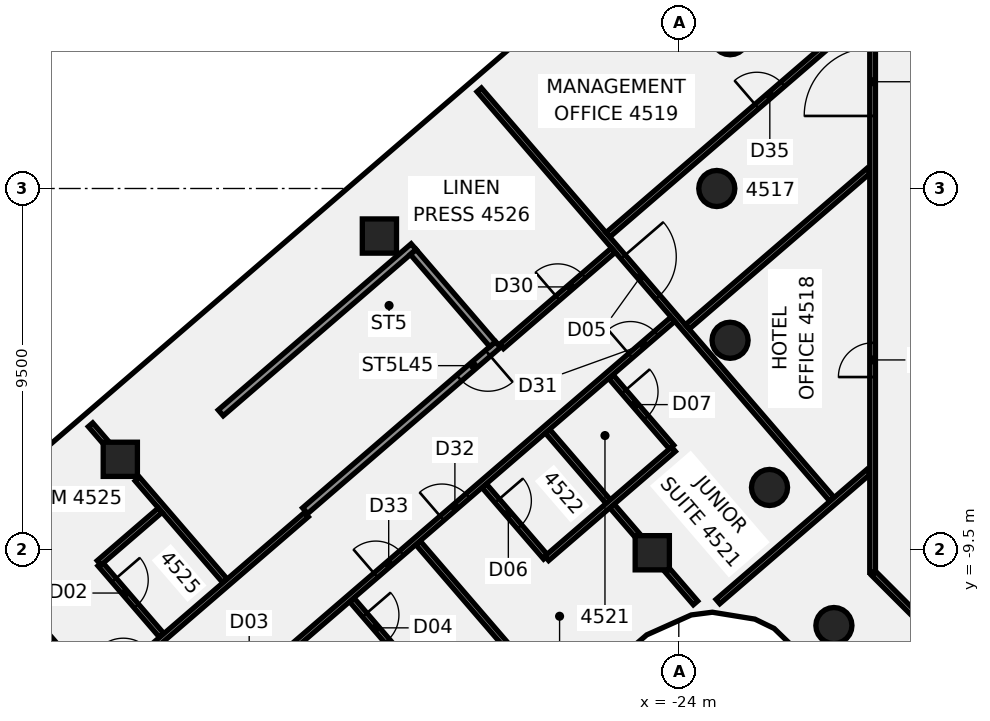
"""IFC4 building model, lengths in metres.
Left out: names, types, materials, properties, quantities, classifications, styles, units other than length and angle.
Written with IfcOpenShell. Run it as: python <this file> out.ifc"""

import sys

from ifc_helpers import new_model, si_unit, direction, frame, frame_2d, origin, origin_2d, place, context, subcontext, project, spatial, polyline, rectangle, circle, outline, extrude, element, fill, save


model = new_model("IFC4")
c1 = context("Model", 3, precision=1e-05, world=origin(), true_north=direction((0.0, 1.0)))
c2 = subcontext(c1, "Body", "Model", "MODEL_VIEW")
j1 = project(units=[si_unit("LENGTHUNIT", "METRE"), si_unit("PLANEANGLEUNIT", "RADIAN")], contexts=[c1])
p1 = place(None, origin())
s1 = spatial("IfcSite", under=j1, at=p1, CompositionType="ELEMENT")
p2 = place(p1, origin())
s2 = spatial("IfcBuilding", under=s1, at=p2, CompositionType="ELEMENT")
p3 = place(p2, frame((0.0, 0.0, 182.5)))
s3 = spatial("IfcBuildingStorey", under=s2, at=p3, CompositionType="ELEMENT", Elevation=182.5)
for number, where, z_axis, x_axis in (
    (1, (-22.651, 3.994, -0.14), (0.0, 0.0, 1.0), (1.0, 0.0, 0.0)),
    (2, (-23.0, 0.0, -0.14), (0.0, 0.0, 1.0), (1.0, 0.0, 0.0)),
    (3, (-22.651, -3.994, -0.14), (0.0, 0.0, 1.0), (1.0, 0.0, 0.0)),
    (4, (-21.613, -7.866, -0.14), (0.0, 0.0, 1.0), (1.0, 0.0, 0.0)),
    (5, (-19.919, -11.5, -0.14), (0.0, 0.0, 1.0), (1.0, 0.0, 0.0)),
):
    element("IfcColumn", number, at=place(p3, frame(where, z_axis=z_axis, x_axis=x_axis)), inside=s3, PredefinedType="COLUMN", context=c2, shape_type="SweptSolid", body=[
        extrude(circle(Radius=0.475, at=origin_2d()), origin(), (0.0, 0.0, 1.0), 3.6),
    ])
p4 = place(p3, frame((-38.696, -7.126, -0.133), z_axis=(0.036686006843, -0.083863399406, 0.995801720797), x_axis=(0.758162598415, 0.651508924479, 0.026936883435)))
e6 = element("IfcColumn", 6, at=p4, inside=s3, PredefinedType="COLUMN", context=c2, shape_type="SweptSolid", body=[
    extrude(rectangle(XDim=0.9, YDim=0.9, at=origin_2d()), origin(), (0.0, 0.0, 1.0), 3.607),
])
p5 = place(p3, frame((-24.698, -9.584, -0.135), z_axis=(0.048576320124, -0.013229584391, 0.998731855515), x_axis=(-0.651247732409, 0.757717932984, 0.04171240903)))
e7 = element("IfcColumn", 7, at=p5, inside=s3, PredefinedType="COLUMN", context=c2, shape_type="SweptSolid", body=[
    extrude(rectangle(XDim=0.9, YDim=0.9, at=origin_2d()), origin(), (0.0, 0.0, 1.0), 3.599),
])
p6 = place(p3, frame((-31.878, -1.251, -0.135), z_axis=(0.006783926741, -0.049929700814, 0.99872969482), x_axis=(0.757710068374, 0.652013787216, 0.027449472935)))
e8 = element("IfcColumn", 8, at=p6, inside=s3, PredefinedType="COLUMN", context=c2, shape_type="SweptSolid", body=[
    extrude(rectangle(XDim=0.9, YDim=0.9, at=origin_2d()), origin(), (0.0, 0.0, 1.0), 3.599),
])
p7 = place(p3, frame((-42.888, -9.154, 0.0), z_axis=(0.0, 0.0, 1.0), x_axis=(0.652715459728, -0.75760314719, 0.0)))
e9 = element("IfcWall", 9, at=p7, inside=s3, PredefinedType="PARTITIONING", context=c2, shape_type="SweptSolid", body=[
    extrude(rectangle(XDim=13.403, YDim=0.15, at=frame_2d((6.701, 0.0))), origin(), (0.0, 0.0, 1.0), 2.864),
])
p8 = place(p7, frame((9.099, 0.0, 0.0)))
e10 = element("IfcOpeningElement", 10, at=p8, cuts=e9, PredefinedType="OPENING", context=c2, shape_type="SweptSolid", body=[
    extrude(rectangle(XDim=1.8, YDim=2.1, at=frame_2d((0.9, 1.05))), frame((0.0, 0.085, 0.0), z_axis=(0.0, -1.0, 0.0), x_axis=(1.0, 0.0, 0.0)), (0.0, 0.0, 1.0), 0.17),
])
p9 = place(p3, frame((-39.479, -6.217, 0.0), z_axis=(0.0, 0.0, 1.0), x_axis=(0.652651234918, -0.757658475541, 0.0)))
e11 = element("IfcWall", 11, at=p9, inside=s3, PredefinedType="PARTITIONING", context=c2, shape_type="SweptSolid", body=[
    extrude(rectangle(XDim=0.821, YDim=0.15, at=frame_2d((0.41, 0.0))), origin(), (0.0, 0.0, 1.0), 2.864),
])
p10 = place(p3, frame((-38.248, -7.646, 0.0), z_axis=(0.0, 0.0, 1.0), x_axis=(0.652741368874, -0.757580824309, 0.0)))
e12 = element("IfcWall", 12, at=p10, inside=s3, PredefinedType="PARTITIONING", context=c2, shape_type="SweptSolid", body=[
    extrude(rectangle(XDim=3.533, YDim=0.15, at=frame_2d((1.766, 0.0))), origin(), (0.0, 0.0, 1.0), 2.864),
])
p11 = place(p3, frame((-39.227, -9.879, 0.0), z_axis=(0.0, 0.0, 1.0), x_axis=(0.652686423647, -0.757628162351, 0.0)))
e13 = element("IfcWall", 13, at=p11, inside=s3, PredefinedType="PARTITIONING", context=c2, shape_type="SweptSolid", body=[
    extrude(rectangle(XDim=2.48, YDim=0.15, at=frame_2d((1.24, 0.0))), origin(), (0.0, 0.0, 1.0), 2.864),
])
p12 = place(p11, frame((0.56, 0.0, 0.0)))
e14 = element("IfcOpeningElement", 14, at=p12, cuts=e13, PredefinedType="OPENING", context=c2, shape_type="SweptSolid", body=[
    extrude(rectangle(XDim=0.9, YDim=2.1, at=frame_2d((0.45, 1.05))), frame((0.0, 0.085, 0.0), z_axis=(0.0, -1.0, 0.0), x_axis=(1.0, 0.0, 0.0)), (0.0, 0.0, 1.0), 0.17),
])
p13 = place(p3, frame((-32.604, -10.826, 0.0), z_axis=(0.0, 0.0, 1.0), x_axis=(0.652688747073, -0.757626160745, 0.0)))
e15 = element("IfcWall", 15, at=p13, inside=s3, PredefinedType="PARTITIONING", context=c2, shape_type="SweptSolid", body=[
    extrude(rectangle(XDim=2.445, YDim=0.15, at=frame_2d((1.223, 0.0))), origin(), (0.0, 0.0, 1.0), 2.864),
])
p14 = place(p13, frame((0.52, 0.0, 0.0)))
e16 = element("IfcOpeningElement", 16, at=p14, cuts=e15, PredefinedType="OPENING", context=c2, shape_type="SweptSolid", body=[
    extrude(rectangle(XDim=0.9, YDim=2.1, at=frame_2d((0.45, 1.05))), frame((0.0, 0.085, 0.0), z_axis=(0.0, -1.0, 0.0), x_axis=(1.0, 0.0, 0.0)), (0.0, 0.0, 1.0), 0.17),
])
p15 = place(p3, frame((-30.862, -9.325, 0.0), z_axis=(0.0, 0.0, 1.0), x_axis=(0.652740266832, -0.757581773841, 0.0)))
e17 = element("IfcWall", 17, at=p15, inside=s3, PredefinedType="PARTITIONING", context=c2, shape_type="SweptSolid", body=[
    extrude(rectangle(XDim=5.451, YDim=0.15, at=frame_2d((2.726, 0.0))), origin(), (0.0, 0.0, 1.0), 2.864),
])
p16 = place(p3, frame((-29.251, 2.595, 0.0), z_axis=(0.0, 0.0, 1.0), x_axis=(0.652713725704, -0.757604641141, 0.0)))
e18 = element("IfcWall", 18, at=p16, inside=s3, PredefinedType="PARTITIONING", context=c2, shape_type="SweptSolid", body=[
    extrude(rectangle(XDim=14.219, YDim=0.15, at=frame_2d((7.109, 0.0))), origin(), (0.0, 0.0, 1.0), 2.864),
])
p17 = place(p16, frame((5.799, 0.0, 0.0)))
e19 = element("IfcOpeningElement", 19, at=p17, cuts=e18, PredefinedType="OPENING", context=c2, shape_type="SweptSolid", body=[
    extrude(rectangle(XDim=1.4, YDim=2.1, at=frame_2d((0.7, 1.05))), frame((0.0, 0.085, 0.0), z_axis=(0.0, -1.0, 0.0), x_axis=(1.0, 0.0, 0.0)), (0.0, 0.0, 1.0), 0.17),
])
p18 = place(p3, frame((-29.119, -7.823, 0.0), z_axis=(0.0, 0.0, 1.0), x_axis=(0.652888980145, -0.757453615481, 0.0)))
e20 = element("IfcWall", 20, at=p18, inside=s3, PredefinedType="PARTITIONING", context=c2, shape_type="SweptSolid", body=[
    extrude(rectangle(XDim=2.479, YDim=0.15, at=frame_2d((1.24, 0.0))), origin(), (0.0, 0.0, 1.0), 2.864),
])
p19 = place(p18, frame((0.52, 0.0, 0.0)))
e21 = element("IfcOpeningElement", 21, at=p19, cuts=e20, PredefinedType="OPENING", context=c2, shape_type="SweptSolid", body=[
    extrude(rectangle(XDim=0.9, YDim=2.1, at=frame_2d((0.45, 1.05))), frame((0.0, 0.085, 0.0), z_axis=(0.0, -1.0, 0.0), x_axis=(1.0, 0.0, 0.0)), (0.0, 0.0, 1.0), 0.17),
])
p20 = place(p3, frame((-27.453, -6.388, 0.0), z_axis=(0.0, 0.0, 1.0), x_axis=(0.652892175674, -0.757450861075, 0.0)))
e22 = element("IfcWall", 22, at=p20, inside=s3, PredefinedType="PARTITIONING", context=c2, shape_type="SweptSolid", body=[
    extrude(rectangle(XDim=3.766, YDim=0.15, at=frame_2d((1.883, 0.0))), origin(), (0.0, 0.0, 1.0), 2.864),
])
p21 = place(p3, frame((-24.299, -10.048, 0.0), z_axis=(0.0, 0.0, 1.0), x_axis=(0.652995188074, -0.75736205632, 0.0)))
e23 = element("IfcWall", 23, at=p21, inside=s3, PredefinedType="PARTITIONING", context=c2, shape_type="SweptSolid", body=[
    extrude(rectangle(XDim=1.13, YDim=0.15, at=frame_2d((0.565, 0.0))), origin(), (0.0, 0.0, 1.0), 2.864),
])
p22 = place(p3, frame((-25.786, -4.952, 0.0), z_axis=(0.0, 0.0, 1.0), x_axis=(0.652886276294, -0.757455946063, 0.0)))
e24 = element("IfcWall", 24, at=p22, inside=s3, PredefinedType="PARTITIONING", context=c2, shape_type="SweptSolid", body=[
    extrude(rectangle(XDim=2.444, YDim=0.15, at=frame_2d((1.222, 0.0))), origin(), (0.0, 0.0, 1.0), 2.864),
])
p23 = place(p22, frame((0.52, 0.0, 0.0)))
e25 = element("IfcOpeningElement", 25, at=p23, cuts=e24, PredefinedType="OPENING", context=c2, shape_type="SweptSolid", body=[
    extrude(rectangle(XDim=0.9, YDim=2.1, at=frame_2d((0.45, 1.05))), frame((0.0, 0.085, 0.0), z_axis=(0.0, -1.0, 0.0), x_axis=(1.0, 0.0, 0.0)), (0.0, 0.0, 1.0), 0.17),
])
p24 = place(p3, frame((-18.872, -10.128, 0.0), z_axis=(0.0, 0.0, 1.0), x_axis=(0.707106781187, -0.707106781187, 0.0)))
e26 = element("IfcWall", 26, at=p24, inside=s3, PredefinedType="PARTITIONING", context=c2, shape_type="SweptSolid", body=[
    extrude(rectangle(XDim=2.465, YDim=0.15, at=frame_2d((1.232, 0.0))), origin(), (0.0, 0.0, 1.0), 2.864),
])
p25 = place(p3, frame((-39.238, -13.268, 0.0), z_axis=(0.0, 0.0, 1.0), x_axis=(0.757588514566, 0.652732443346, 0.0)))
e27 = element("IfcWall", 27, at=p25, inside=s3, PredefinedType="PARTITIONING", context=c2, shape_type="SweptSolid", body=[
    extrude(rectangle(XDim=7.181, YDim=0.15, at=frame_2d((3.59, 0.0))), origin(), (0.0, 0.0, 1.0), 2.864),
])
p26 = place(p25, frame((0.82, 0.0, 0.0)))
e28 = element("IfcOpeningElement", 28, at=p26, cuts=e27, PredefinedType="OPENING", context=c2, shape_type="SweptSolid", body=[
    extrude(rectangle(XDim=0.9, YDim=2.1, at=frame_2d((0.45, 1.05))), frame((0.0, 0.085, 0.0), z_axis=(0.0, -1.0, 0.0), x_axis=(1.0, 0.0, 0.0)), (0.0, 0.0, 1.0), 0.17),
])
p27 = place(p3, frame((-28.663, -4.156, 0.0), z_axis=(0.0, 0.0, 1.0), x_axis=(0.757628792985, 0.652685691615, 0.0)))
e29 = element("IfcWall", 29, at=p27, inside=s3, PredefinedType="PARTITIONING", context=c2, shape_type="SweptSolid", body=[
    extrude(rectangle(XDim=3.88, YDim=0.15, at=frame_2d((1.94, 0.0))), origin(), (0.0, 0.0, 1.0), 2.864),
])
p28 = place(p27, frame((1.95, 0.0, 0.0)))
e30 = element("IfcOpeningElement", 30, at=p28, cuts=e29, PredefinedType="OPENING", context=c2, shape_type="SweptSolid", body=[
    extrude(rectangle(XDim=0.9, YDim=2.1, at=frame_2d((0.45, 1.05))), frame((0.0, 0.085, 0.0), z_axis=(0.0, -1.0, 0.0), x_axis=(1.0, 0.0, 0.0)), (0.0, 0.0, 1.0), 0.17),
])
p29 = place(p3, frame((-39.253, -9.849, 0.0), z_axis=(0.0, 0.0, 1.0), x_axis=(0.757358886991, 0.652998863932, 0.0)))
e31 = element("IfcWall", 31, at=p29, inside=s3, PredefinedType="PARTITIONING", context=c2, shape_type="SweptSolid", body=[
    extrude(rectangle(XDim=2.119, YDim=0.15, at=frame_2d((1.06, 0.0))), origin(), (0.0, 0.0, 1.0), 2.864),
])
p30 = place(p3, frame((-37.671, -15.086, 0.0), z_axis=(0.0, 0.0, 1.0), x_axis=(0.757564439781, 0.652760384505, 0.0)))
e32 = element("IfcWall", 32, at=p30, inside=s3, PredefinedType="PARTITIONING", context=c2, shape_type="SweptSolid", body=[
    extrude(rectangle(XDim=17.839, YDim=0.15, at=frame_2d((8.92, 0.0))), origin(), (0.0, 0.0, 1.0), 2.864),
])
p31 = place(p30, frame((16.369, 0.0, 0.0)))
e33 = element("IfcOpeningElement", 33, at=p31, cuts=e32, PredefinedType="OPENING", context=c2, shape_type="SweptSolid", body=[
    extrude(rectangle(XDim=0.9, YDim=2.1, at=frame_2d((0.45, 1.05))), frame((0.0, 0.085, 0.0), z_axis=(0.0, -1.0, 0.0), x_axis=(1.0, 0.0, 0.0)), (0.0, 0.0, 1.0), 0.17),
])
p32 = place(p30, frame((9.819, 0.0, 0.0)))
e34 = element("IfcOpeningElement", 34, at=p32, cuts=e32, PredefinedType="OPENING", context=c2, shape_type="SweptSolid", body=[
    extrude(rectangle(XDim=0.9, YDim=2.1, at=frame_2d((0.45, 1.05))), frame((0.0, 0.085, 0.0), z_axis=(0.0, -1.0, 0.0), x_axis=(1.0, 0.0, 0.0)), (0.0, 0.0, 1.0), 0.17),
])
p33 = place(p30, frame((7.52, 0.0, 0.0)))
e35 = element("IfcOpeningElement", 35, at=p33, cuts=e32, PredefinedType="OPENING", context=c2, shape_type="SweptSolid", body=[
    extrude(rectangle(XDim=0.9, YDim=2.1, at=frame_2d((0.45, 1.05))), frame((0.0, 0.085, 0.0), z_axis=(0.0, -1.0, 0.0), x_axis=(1.0, 0.0, 0.0)), (0.0, 0.0, 1.0), 0.17),
])
p34 = place(p30, frame((0.82, 0.0, 0.0)))
e36 = element("IfcOpeningElement", 36, at=p34, cuts=e32, PredefinedType="OPENING", context=c2, shape_type="SweptSolid", body=[
    extrude(rectangle(XDim=0.9, YDim=2.1, at=frame_2d((0.45, 1.05))), frame((0.0, 0.085, 0.0), z_axis=(0.0, -1.0, 0.0), x_axis=(1.0, 0.0, 0.0)), (0.0, 0.0, 1.0), 0.17),
])
p35 = place(p3, frame((-27.473, -9.732, 0.0), z_axis=(0.0, 0.0, 1.0), x_axis=(0.757652172853, 0.652658551595, 0.0)))
e37 = element("IfcWall", 37, at=p35, inside=s3, PredefinedType="PARTITIONING", context=c2, shape_type="SweptSolid", body=[
    extrude(rectangle(XDim=4.399, YDim=0.15, at=frame_2d((2.2, 0.0))), origin(), (0.0, 0.0, 1.0), 2.864),
])
p36 = place(p3, frame((-25.862, -1.216, 0.0), z_axis=(0.0, 0.0, 1.0), x_axis=(0.757576468923, 0.652746423762, 0.0)))
e38 = element("IfcWall", 38, at=p36, inside=s3, PredefinedType="PARTITIONING", context=c2, shape_type="SweptSolid", body=[
    extrude(rectangle(XDim=9.05, YDim=0.15, at=frame_2d((4.525, 0.0))), origin(), (0.0, 0.0, 1.0), 2.864),
])
p37 = place(p36, frame((5.17, 0.0, 0.0)))
e39 = element("IfcOpeningElement", 39, at=p37, cuts=e38, PredefinedType="OPENING", context=c2, shape_type="SweptSolid", body=[
    extrude(rectangle(XDim=0.9, YDim=2.1, at=frame_2d((0.45, 1.05))), frame((0.0, 0.085, 0.0), z_axis=(0.0, -1.0, 0.0), x_axis=(1.0, 0.0, 0.0)), (0.0, 0.0, 1.0), 0.17),
])
p38 = place(p3, frame((-23.774, -3.641, 0.0), z_axis=(0.0, 0.0, 1.0), x_axis=(0.757583902186, 0.65273779663, 0.0)))
e40 = element("IfcWall", 40, at=p38, inside=s3, PredefinedType="PARTITIONING", context=c2, shape_type="SweptSolid", body=[
    extrude(rectangle(XDim=6.294, YDim=0.15, at=frame_2d((3.147, 0.0))), origin(), (0.0, 0.0, 1.0), 2.864),
])
p39 = place(p3, frame((-22.97, -10.868, 0.0), z_axis=(0.0, 0.0, 1.0), x_axis=(0.75753804944, 0.6527910107, 0.0)))
e41 = element("IfcWall", 41, at=p39, inside=s3, PredefinedType="PARTITIONING", context=c2, shape_type="SweptSolid", body=[
    extrude(rectangle(XDim=5.233, YDim=0.15, at=frame_2d((2.616, 0.0))), origin(), (0.0, 0.0, 1.0), 2.864),
])
p40 = place(p3, frame((-18.9, -10.1, 0.0), z_axis=(0.0, 0.0, 1.0), x_axis=(0.0, 1.0, 0.0)))
e42 = element("IfcWall", 42, at=p40, inside=s3, PredefinedType="PARTITIONING", context=c2, shape_type="SweptSolid", body=[
    extrude(rectangle(XDim=20.2, YDim=0.15, at=frame_2d((10.1, 0.0))), origin(), (0.0, 0.0, 1.0), 2.864),
])
p41 = place(p40, frame((12.009, 0.0, 0.0)))
e43 = element("IfcOpeningElement", 43, at=p41, cuts=e42, PredefinedType="OPENING", context=c2, shape_type="SweptSolid", body=[
    extrude(rectangle(XDim=1.8, YDim=2.1, at=frame_2d((0.9, 1.05))), frame((0.0, 0.085, 0.0), z_axis=(0.0, -1.0, 0.0), x_axis=(1.0, 0.0, 0.0)), (0.0, 0.0, 1.0), 0.17),
])
p42 = place(p40, frame((5.139, 0.0, 0.0)))
e44 = element("IfcOpeningElement", 44, at=p42, cuts=e42, PredefinedType="OPENING", context=c2, shape_type="SweptSolid", body=[
    extrude(rectangle(XDim=0.9, YDim=2.1, at=frame_2d((0.45, 1.05))), frame((0.0, 0.085, 0.0), z_axis=(0.0, -1.0, 0.0), x_axis=(1.0, 0.0, 0.0)), (0.0, 0.0, 1.0), 0.17),
])
p43 = place(p3, frame((-28.758, -4.106, -0.14), z_axis=(0.0, 0.0, 1.0), x_axis=(-0.757613125952, -0.652703877257, 0.0)))
e45 = element("IfcWall", 45, at=p43, inside=s3, PredefinedType="SHEAR", context=c2, shape_type="SweptSolid", body=[
    extrude(rectangle(XDim=6.7, YDim=0.2, at=frame_2d((3.35, 0.0))), origin(), (0.0, 0.0, 1.0), 3.004),
])
p44 = place(p43, frame((0.35, 0.0, 0.0)))
e46 = element("IfcOpeningElement", 46, at=p44, cuts=e45, PredefinedType="OPENING", context=c2, shape_type="SweptSolid", body=[
    extrude(rectangle(XDim=1.0, YDim=2.1, at=frame_2d((0.5, 1.05))), frame((0.0, 0.11, 0.0), z_axis=(0.0, -1.0, 0.0), x_axis=(1.0, 0.0, 0.0)), (0.0, 0.0, 1.0), 0.22),
])
p45 = place(p3, frame((-30.977, -1.531, -0.14), z_axis=(0.0, 0.0, 1.0), x_axis=(-0.757595106879, -0.652724791955, 0.0)))
e47 = element("IfcWall", 47, at=p45, inside=s3, PredefinedType="SHEAR", context=c2, shape_type="SweptSolid", body=[
    extrude(rectangle(XDim=6.7, YDim=0.2, at=frame_2d((3.35, 0.0))), origin(), (0.0, 0.0, 1.0), 3.004),
])
p46 = place(p3, frame((-30.988, -1.672, -0.14), z_axis=(0.0, 0.0, 1.0), x_axis=(0.652749445371, -0.75757386542, 0.0)))
e48 = element("IfcWall", 48, at=p46, inside=s3, PredefinedType="SHEAR", context=c2, shape_type="SweptSolid", body=[
    extrude(rectangle(XDim=3.2, YDim=0.2, at=frame_2d((1.6, 0.0))), origin(), (0.0, 0.0, 1.0), 3.004),
])
p47 = place(p3, frame((0.0, 0.0, -0.14)))
e49 = element("IfcWall", 49, at=p47, inside=s3, PredefinedType="SHEAR", context=c2, shape_type="SweptSolid", body=[
    extrude(outline(polyline([(-35.836, -5.849), (-35.988, -5.979), (-33.899, -8.404), (-33.747, -8.273), (-35.836, -5.849)])), origin(), (0.0, 0.0, 1.0), 3.004),
])
p48 = place(p12, origin())
e50 = element("IfcDoor", 50, at=p48, inside=s3, OperationType="SINGLE_SWING_RIGHT", PredefinedType="DOOR", context=c2, shape_type="SweptSolid", body=[
    extrude(rectangle(XDim=0.9, YDim=2.1, at=frame_2d((0.45, 1.05))), frame((0.0, 0.025, 0.0), z_axis=(0.0, -1.0, 0.0), x_axis=(1.0, 0.0, 0.0)), (0.0, 0.0, 1.0), 0.05),
])
fill(e14, e50)
p49 = place(p14, frame((0.9, 0.0, 0.0), z_axis=(0.0, 0.0, 1.0), x_axis=(-1.0, 0.0, 0.0)))
e51 = element("IfcDoor", 51, at=p49, inside=s3, OperationType="SINGLE_SWING_LEFT", PredefinedType="DOOR", context=c2, shape_type="SweptSolid", body=[
    extrude(rectangle(XDim=0.9, YDim=2.1, at=frame_2d((0.45, 1.05))), frame((0.0, 0.025, 0.0), z_axis=(0.0, -1.0, 0.0), x_axis=(1.0, 0.0, 0.0)), (0.0, 0.0, 1.0), 0.05),
])
fill(e16, e51)
p50 = place(p17, origin())
e52 = element("IfcDoor", 52, at=p50, inside=s3, OperationType="DOUBLE_DOOR_SINGLE_SWING", PredefinedType="DOOR", context=c2, shape_type="SweptSolid", body=[
    extrude(rectangle(XDim=1.4, YDim=2.1, at=frame_2d((0.7, 1.05))), frame((0.0, 0.025, 0.0), z_axis=(0.0, -1.0, 0.0), x_axis=(1.0, 0.0, 0.0)), (0.0, 0.0, 1.0), 0.05),
])
fill(e19, e52)
p51 = place(p19, origin())
e53 = element("IfcDoor", 53, at=p51, inside=s3, OperationType="SINGLE_SWING_RIGHT", PredefinedType="DOOR", context=c2, shape_type="SweptSolid", body=[
    extrude(rectangle(XDim=0.9, YDim=2.1, at=frame_2d((0.45, 1.05))), frame((0.0, 0.025, 0.0), z_axis=(0.0, -1.0, 0.0), x_axis=(1.0, 0.0, 0.0)), (0.0, 0.0, 1.0), 0.05),
])
fill(e21, e53)
p52 = place(p23, frame((0.9, 0.0, 0.0), z_axis=(0.0, 0.0, 1.0), x_axis=(-1.0, 0.0, 0.0)))
e54 = element("IfcDoor", 54, at=p52, inside=s3, OperationType="SINGLE_SWING_LEFT", PredefinedType="DOOR", context=c2, shape_type="SweptSolid", body=[
    extrude(rectangle(XDim=0.9, YDim=2.1, at=frame_2d((0.45, 1.05))), frame((0.0, 0.025, 0.0), z_axis=(0.0, -1.0, 0.0), x_axis=(1.0, 0.0, 0.0)), (0.0, 0.0, 1.0), 0.05),
])
fill(e25, e54)
p53 = place(p28, origin())
e55 = element("IfcDoor", 55, at=p53, inside=s3, OperationType="SINGLE_SWING_LEFT", PredefinedType="DOOR", context=c2, shape_type="SweptSolid", body=[
    extrude(rectangle(XDim=0.9, YDim=2.1, at=frame_2d((0.45, 1.05))), frame((0.0, 0.025, 0.0), z_axis=(0.0, -1.0, 0.0), x_axis=(1.0, 0.0, 0.0)), (0.0, 0.0, 1.0), 0.05),
])
fill(e30, e55)
p54 = place(p31, frame((0.9, 0.0, 0.0), z_axis=(0.0, 0.0, 1.0), x_axis=(-1.0, 0.0, 0.0)))
e56 = element("IfcDoor", 56, at=p54, inside=s3, OperationType="SINGLE_SWING_RIGHT", PredefinedType="DOOR", context=c2, shape_type="SweptSolid", body=[
    extrude(rectangle(XDim=0.9, YDim=2.1, at=frame_2d((0.45, 1.05))), frame((0.0, 0.025, 0.0), z_axis=(0.0, -1.0, 0.0), x_axis=(1.0, 0.0, 0.0)), (0.0, 0.0, 1.0), 0.05),
])
fill(e33, e56)
p55 = place(p32, frame((0.9, 0.0, 0.0), z_axis=(0.0, 0.0, 1.0), x_axis=(-1.0, 0.0, 0.0)))
e57 = element("IfcDoor", 57, at=p55, inside=s3, OperationType="SINGLE_SWING_RIGHT", PredefinedType="DOOR", context=c2, shape_type="SweptSolid", body=[
    extrude(rectangle(XDim=0.9, YDim=2.1, at=frame_2d((0.45, 1.05))), frame((0.0, 0.025, 0.0), z_axis=(0.0, -1.0, 0.0), x_axis=(1.0, 0.0, 0.0)), (0.0, 0.0, 1.0), 0.05),
])
fill(e34, e57)
p56 = place(p33, frame((0.9, 0.0, 0.0), z_axis=(0.0, 0.0, 1.0), x_axis=(-1.0, 0.0, 0.0)))
e58 = element("IfcDoor", 58, at=p56, inside=s3, OperationType="SINGLE_SWING_LEFT", PredefinedType="DOOR", context=c2, shape_type="SweptSolid", body=[
    extrude(rectangle(XDim=0.9, YDim=2.1, at=frame_2d((0.45, 1.05))), frame((0.0, 0.025, 0.0), z_axis=(0.0, -1.0, 0.0), x_axis=(1.0, 0.0, 0.0)), (0.0, 0.0, 1.0), 0.05),
])
fill(e35, e58)
p57 = place(p37, origin())
e59 = element("IfcDoor", 59, at=p57, inside=s3, OperationType="SINGLE_SWING_LEFT", PredefinedType="DOOR", context=c2, shape_type="SweptSolid", body=[
    extrude(rectangle(XDim=0.9, YDim=2.1, at=frame_2d((0.45, 1.05))), frame((0.0, 0.025, 0.0), z_axis=(0.0, -1.0, 0.0), x_axis=(1.0, 0.0, 0.0)), (0.0, 0.0, 1.0), 0.05),
])
fill(e39, e59)
p58 = place(p41, frame((1.8, 0.0, 0.0), z_axis=(0.0, 0.0, 1.0), x_axis=(-1.0, 0.0, 0.0)))
e60 = element("IfcDoor", 60, at=p58, inside=s3, OperationType="DOUBLE_DOOR_SINGLE_SWING", PredefinedType="DOOR", context=c2, shape_type="SweptSolid", body=[
    extrude(rectangle(XDim=1.8, YDim=2.1, at=frame_2d((0.9, 1.05))), frame((0.0, 0.025, 0.0), z_axis=(0.0, -1.0, 0.0), x_axis=(1.0, 0.0, 0.0)), (0.0, 0.0, 1.0), 0.05),
])
fill(e43, e60)
p59 = place(p42, origin())
e61 = element("IfcDoor", 61, at=p59, inside=s3, OperationType="SINGLE_SWING_RIGHT", PredefinedType="DOOR", context=c2, shape_type="SweptSolid", body=[
    extrude(rectangle(XDim=0.9, YDim=2.1, at=frame_2d((0.45, 1.05))), frame((0.0, 0.025, 0.0), z_axis=(0.0, -1.0, 0.0), x_axis=(1.0, 0.0, 0.0)), (0.0, 0.0, 1.0), 0.05),
])
fill(e44, e61)
p60 = place(p44, origin())
e62 = element("IfcDoor", 62, at=p60, inside=s3, OperationType="SINGLE_SWING_LEFT", PredefinedType="DOOR", context=c2, shape_type="SweptSolid", body=[
    extrude(rectangle(XDim=1.0, YDim=2.1, at=frame_2d((0.5, 1.05))), frame((0.0, 0.025, 0.0), z_axis=(0.0, -1.0, 0.0), x_axis=(1.0, 0.0, 0.0)), (0.0, 0.0, 1.0), 0.05),
])
fill(e46, e62)
save(model, sys.argv[1])
